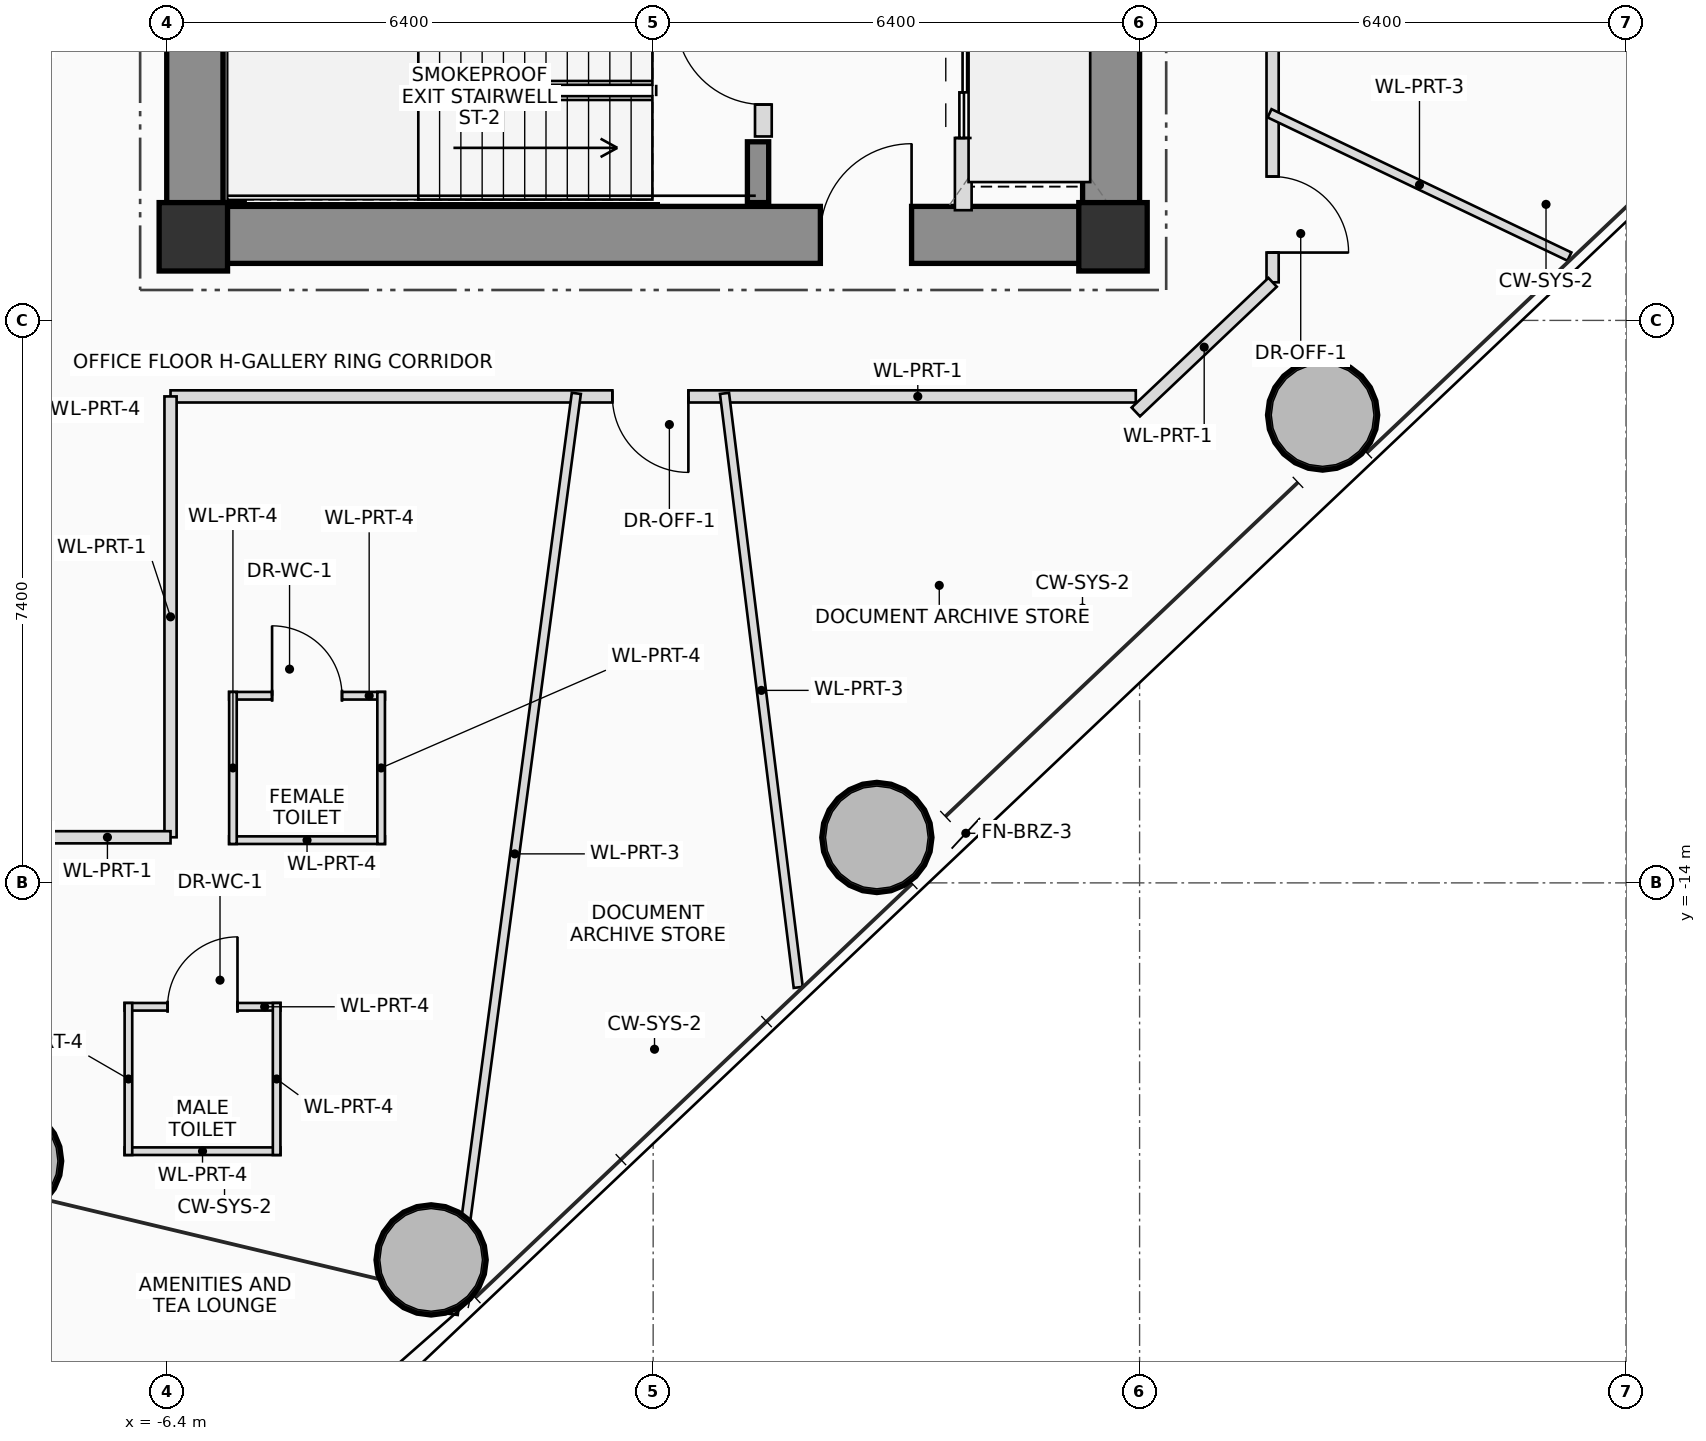
"""IFC4 building model, lengths in metres.
Left out: names, types, materials, properties, quantities, classifications, styles, units other than length and angle.
Written with IfcOpenShell. Run it as: python <this file> out.ifc"""

import sys

from ifc_helpers import new_model, si_unit, direction, frame, frame_2d, origin, origin_2d, place, context, subcontext, project, spatial, rectangle, hollow_circle, extrude, source, transform, mapped, element, fill, save


model = new_model("IFC4")
c1 = context("Model", 3, precision=1e-05, world=origin(), true_north=direction((0.0, 1.0)))
c2 = subcontext(c1, "Body", "Model", "MODEL_VIEW")
j1 = project(units=[si_unit("LENGTHUNIT", "METRE"), si_unit("PLANEANGLEUNIT", "RADIAN")], contexts=[c1])
p1 = place(None, origin())
s1 = spatial("IfcSite", under=j1, at=p1, CompositionType="ELEMENT")
p2 = place(p1, origin())
s2 = spatial("IfcBuilding", under=s1, at=p2, CompositionType="ELEMENT")
p3 = place(p2, frame((0.0, 0.0, 116.15)))
s3 = spatial("IfcBuildingStorey", under=s2, at=p3, CompositionType="ELEMENT", Elevation=116.15)
m1 = source(origin(), c2, "Body", "SweptSolid", [
    extrude(rectangle(XDim=0.9, YDim=0.9, at=origin_2d()), origin(), (0.0, 0.0, 1.0), 3.75),
])
for number, where, z_axis, x_axis in (
    (1, (-6.05, -5.5, 0.0), (0.0, 0.0, 1.0), (1.0, 0.0, 0.0)),
    (2, (6.05, -5.5, 0.0), (0.0, 0.0, 1.0), (1.0, 0.0, 0.0)),
):
    element("IfcColumn", number, at=place(p3, frame(where, z_axis=z_axis, x_axis=x_axis)), inside=s3, PredefinedType="COLUMN", context=c2, shape_type="MappedRepresentation", body=[
        mapped(m1, transform((0.0, 0.0, 0.0), scale=1.0)),
    ])
p4 = place(p3, frame((-6.4, -5.475, 0.0), z_axis=(0.0, 0.0, 1.0), x_axis=(1.0, 0.0, 0.0)))
e3 = element("IfcWall", 3, at=p4, inside=s3, PredefinedType="SHEAR", context=c2, shape_type="SweptSolid", body=[
    extrude(rectangle(XDim=12.8, YDim=0.75, at=frame_2d((6.4, 0.0))), origin(), (0.0, 0.0, 1.0), 3.75),
])
p5 = place(p4, frame((8.6, 0.0, 0.0)))
e4 = element("IfcOpeningElement", 4, at=p5, cuts=e3, PredefinedType="OPENING", context=c2, shape_type="SweptSolid", body=[
    extrude(rectangle(XDim=1.2, YDim=2.2, at=frame_2d((0.6, 1.1))), frame((0.0, 0.385, 0.0), z_axis=(0.0, -1.0, 0.0), x_axis=(1.0, 0.0, 0.0)), (0.0, 0.0, 1.0), 0.77),
])
p6 = place(p3, frame((6.025, -5.1, 0.0), z_axis=(0.0, 0.0, 1.0), x_axis=(0.0, 1.0, 0.0)))
e5 = element("IfcWall", 5, at=p6, inside=s3, PredefinedType="SHEAR", context=c2, shape_type="SweptSolid", body=[
    extrude(rectangle(XDim=10.2, YDim=0.75, at=frame_2d((5.1, 0.0))), origin(), (0.0, 0.0, 1.0), 3.75),
])
p7 = place(p3, frame((-6.025, -5.1, 0.0), z_axis=(0.0, 0.0, 1.0), x_axis=(0.0, 1.0, 0.0)))
e6 = element("IfcWall", 6, at=p7, inside=s3, PredefinedType="SHEAR", context=c2, shape_type="SweptSolid", body=[
    extrude(rectangle(XDim=3.35, YDim=0.75, at=frame_2d((1.675, 0.0))), origin(), (0.0, 0.0, 1.0), 3.75),
])
p8 = place(p3, frame((-5.52, -5.05, 0.0), z_axis=(0.0, 0.0, 1.0), x_axis=(0.0, 1.0, 0.0)))
e7 = element("IfcWall", 7, at=p8, inside=s3, PredefinedType="SHEAR", context=c2, shape_type="SweptSolid", body=[
    extrude(rectangle(XDim=2.75, YDim=0.28, at=frame_2d((1.375, 0.0))), origin(), (0.0, 0.0, 1.0), 3.75),
])
p9 = place(p3, frame((1.38, -5.05, 0.0), z_axis=(0.0, 0.0, 1.0), x_axis=(0.0, 1.0, 0.0)))
e8 = element("IfcWall", 8, at=p9, inside=s3, PredefinedType="SHEAR", context=c2, shape_type="SweptSolid", body=[
    extrude(rectangle(XDim=0.8, YDim=0.28, at=frame_2d((0.4, 0.0))), origin(), (0.0, 0.0, 1.0), 3.75),
])
m2 = source(origin(), c2, "Body", "SweptSolid", [
    extrude(hollow_circle(Radius=0.725, WallThickness=0.05, at=origin_2d()), origin(), (0.0, 0.0, 1.0), 3.75),
])
for number, where, z_axis, x_axis in (
    (9, (-2.921, -18.96, 0.0), (0.0, 0.0, 1.0), (1.0, 0.0, 0.0)),
    (10, (2.943, -13.402, 0.0), (0.0, 0.0, 1.0), (1.0, 0.0, 0.0)),
    (11, (8.808, -7.845, 0.0), (0.0, 0.0, 1.0), (1.0, 0.0, 0.0)),
    (12, (-8.507, -17.659, 0.0), (0.0, 0.0, 1.0), (1.0, 0.0, 0.0)),
):
    element("IfcColumn", number, at=place(p3, frame(where, z_axis=z_axis, x_axis=x_axis)), inside=s3, PredefinedType="COLUMN", context=c2, shape_type="MappedRepresentation", body=[
        mapped(m2, transform((0.0, 0.0, 0.0), scale=1.0)),
    ])
p10 = place(p3, frame((1.45, -4.18, 0.0), z_axis=(0.0, 0.0, 1.0), x_axis=(0.0, 1.0, 0.0)))
e13 = element("IfcWall", 13, at=p10, inside=s3, PredefinedType="PLUMBINGWALL", context=c2, shape_type="SweptSolid", body=[
    extrude(rectangle(XDim=1.98, YDim=0.22, at=frame_2d((0.99, 0.0))), origin(), (0.0, 0.0, 1.0), 3.51),
])
p11 = place(p10, frame((0.42, 0.0, 0.0)))
e14 = element("IfcOpeningElement", 14, at=p11, cuts=e13, PredefinedType="OPENING", context=c2, shape_type="SweptSolid", body=[
    extrude(rectangle(XDim=1.15, YDim=2.15, at=frame_2d((0.575, 1.075))), frame((0.0, 0.12, 0.0), z_axis=(0.0, -1.0, 0.0), x_axis=(1.0, 0.0, 0.0)), (0.0, 0.0, 1.0), 0.24),
])
p12 = place(p3, frame((4.08, -5.15, 0.0), z_axis=(0.0, 0.0, 1.0), x_axis=(0.0, 1.0, 0.0)))
e15 = element("IfcWall", 15, at=p12, inside=s3, PredefinedType="PLUMBINGWALL", context=c2, shape_type="SweptSolid", body=[
    extrude(rectangle(XDim=2.95, YDim=0.22, at=frame_2d((1.475, 0.0))), origin(), (0.0, 0.0, 1.0), 3.51),
])
p13 = place(p12, frame((0.95, 0.0, 0.0)))
e16 = element("IfcOpeningElement", 16, at=p13, cuts=e15, PredefinedType="OPENING", context=c2, shape_type="SweptSolid", body=[
    extrude(rectangle(XDim=1.2, YDim=2.25, at=frame_2d((0.6, 1.125))), frame((0.0, 0.12, 0.0), z_axis=(0.0, -1.0, 0.0), x_axis=(1.0, 0.0, 0.0)), (0.0, 0.0, 1.0), 0.24),
])
p14 = place(p3, frame((-6.954, -15.63, 0.0), z_axis=(0.0, 0.0, 1.0), x_axis=(1.0, 0.0, 0.0)))
e17 = element("IfcWall", 17, at=p14, inside=s3, PredefinedType="PARTITIONING", context=c2, shape_type="SweptSolid", body=[
    extrude(rectangle(XDim=2.05, YDim=0.1, at=frame_2d((1.025, 0.0))), origin(), (0.0, 0.0, 1.0), 3.51),
])
p15 = place(p14, frame((0.565, 0.0, 0.0)))
e18 = element("IfcOpeningElement", 18, at=p15, cuts=e17, PredefinedType="OPENING", context=c2, shape_type="SweptSolid", body=[
    extrude(rectangle(XDim=0.92, YDim=2.1, at=frame_2d((0.46, 1.05))), frame((0.0, 0.06, 0.0), z_axis=(0.0, -1.0, 0.0), x_axis=(1.0, 0.0, 0.0)), (0.0, 0.0, 1.0), 0.12),
])
p16 = place(p3, frame((-4.904, -17.53, 0.0), z_axis=(0.0, 0.0, 1.0), x_axis=(-1.0, 0.0, 0.0)))
e19 = element("IfcWall", 19, at=p16, inside=s3, PredefinedType="PARTITIONING", context=c2, shape_type="SweptSolid", body=[
    extrude(rectangle(XDim=2.05, YDim=0.1, at=frame_2d((1.025, 0.0))), origin(), (0.0, 0.0, 1.0), 3.51),
])
for number, where, z_axis, x_axis in (
    (20, (-4.954, -15.58, 0.0), (0.0, 0.0, 1.0), (0.0, -1.0, 0.0)),
    (21, (-6.904, -17.58, 0.0), (0.0, 0.0, 1.0), (0.0, 1.0, 0.0)),
):
    element("IfcWall", number, at=place(p3, frame(where, z_axis=z_axis, x_axis=x_axis)), inside=s3, PredefinedType="PARTITIONING", context=c2, shape_type="SweptSolid", body=[
        extrude(rectangle(XDim=2.0, YDim=0.1, at=frame_2d((1.0, 0.0))), origin(), (0.0, 0.0, 1.0), 3.51),
    ])
p17 = place(p3, frame((-5.579, -11.538, 0.0), z_axis=(0.0, 0.0, 1.0), x_axis=(1.0, 0.0, 0.0)))
e22 = element("IfcWall", 22, at=p17, inside=s3, PredefinedType="PARTITIONING", context=c2, shape_type="SweptSolid", body=[
    extrude(rectangle(XDim=2.05, YDim=0.1, at=frame_2d((1.025, 0.0))), origin(), (0.0, 0.0, 1.0), 2.815),
])
p18 = place(p17, frame((0.565, 0.0, 0.0)))
e23 = element("IfcOpeningElement", 23, at=p18, cuts=e22, PredefinedType="OPENING", context=c2, shape_type="SweptSolid", body=[
    extrude(rectangle(XDim=0.92, YDim=2.1, at=frame_2d((0.46, 1.05))), frame((0.0, 0.06, 0.0), z_axis=(0.0, -1.0, 0.0), x_axis=(1.0, 0.0, 0.0)), (0.0, 0.0, 1.0), 0.12),
])
p19 = place(p3, frame((-3.529, -13.438, 0.0), z_axis=(0.0, 0.0, 1.0), x_axis=(-1.0, 0.0, 0.0)))
e24 = element("IfcWall", 24, at=p19, inside=s3, PredefinedType="PARTITIONING", context=c2, shape_type="SweptSolid", body=[
    extrude(rectangle(XDim=2.05, YDim=0.1, at=frame_2d((1.025, 0.0))), origin(), (0.0, 0.0, 1.0), 2.815),
])
for number, where, z_axis, x_axis in (
    (25, (-3.579, -11.488, 0.0), (0.0, 0.0, 1.0), (0.0, -1.0, 0.0)),
    (26, (-5.529, -13.488, 0.0), (0.0, 0.0, 1.0), (0.0, 1.0, 0.0)),
):
    element("IfcWall", number, at=place(p3, frame(where, z_axis=z_axis, x_axis=x_axis)), inside=s3, PredefinedType="PARTITIONING", context=c2, shape_type="SweptSolid", body=[
        extrude(rectangle(XDim=2.0, YDim=0.1, at=frame_2d((1.0, 0.0))), origin(), (0.0, 0.0, 1.0), 3.015),
    ])
p20 = place(p3, frame((8.15, -0.02, 0.0), z_axis=(0.0, 0.0, 1.0), x_axis=(0.0, -1.0, 0.0)))
e27 = element("IfcWall", 27, at=p20, inside=s3, PredefinedType="PARTITIONING", context=c2, shape_type="SweptSolid", body=[
    extrude(rectangle(XDim=6.079, YDim=0.16, at=frame_2d((3.04, 0.0))), origin(), (0.0, 0.0, 1.0), 2.815),
])
p21 = place(p20, frame((4.688, 0.0, 0.0)))
e28 = element("IfcOpeningElement", 28, at=p21, cuts=e27, PredefinedType="OPENING", context=c2, shape_type="SweptSolid", body=[
    extrude(rectangle(XDim=1.0, YDim=2.25, at=frame_2d((0.5, 1.125))), frame((0.0, 0.09, 0.0), z_axis=(0.0, -1.0, 0.0), x_axis=(1.0, 0.0, 0.0)), (0.0, 0.0, 1.0), 0.18),
])
p22 = place(p3, frame((8.15, -6.099, 0.0), z_axis=(0.0, 0.0, 1.0), x_axis=(-0.725854359245, -0.687848420196, 0.0)))
e29 = element("IfcWall", 29, at=p22, inside=s3, PredefinedType="PARTITIONING", context=c2, shape_type="SweptSolid", body=[
    extrude(rectangle(XDim=2.479, YDim=0.16, at=frame_2d((1.24, 0.0))), origin(), (0.0, 0.0, 1.0), 2.815),
])
p23 = place(p3, frame((6.35, -7.6, 0.0), z_axis=(0.0, 0.0, 1.0), x_axis=(-1.0, 0.0, 0.0)))
e30 = element("IfcWall", 30, at=p23, inside=s3, PredefinedType="PARTITIONING", context=c2, shape_type="SweptSolid", body=[
    extrude(rectangle(XDim=12.7, YDim=0.16, at=frame_2d((6.35, 0.0))), origin(), (0.0, 0.0, 1.0), 2.815),
])
p24 = place(p23, frame((5.887, 0.0, 0.0)))
e31 = element("IfcOpeningElement", 31, at=p24, cuts=e30, PredefinedType="OPENING", context=c2, shape_type="SweptSolid", body=[
    extrude(rectangle(XDim=1.0, YDim=2.25, at=frame_2d((0.5, 1.125))), frame((0.0, 0.09, 0.0), z_axis=(0.0, -1.0, 0.0), x_axis=(1.0, 0.0, 0.0)), (0.0, 0.0, 1.0), 0.18),
])
p25 = place(p3, frame((-6.35, -7.6, 0.0), z_axis=(0.0, 0.0, 1.0), x_axis=(0.0, -1.0, 0.0)))
e32 = element("IfcWall", 32, at=p25, inside=s3, PredefinedType="PARTITIONING", context=c2, shape_type="SweptSolid", body=[
    extrude(rectangle(XDim=5.8, YDim=0.16, at=frame_2d((2.9, 0.0))), origin(), (0.0, 0.0, 1.0), 2.815),
])
p26 = place(p3, frame((-6.35, -13.4, 0.0), z_axis=(0.0, 0.0, 1.0), x_axis=(-1.0, 0.0, 0.0)))
e33 = element("IfcWall", 33, at=p26, inside=s3, PredefinedType="PARTITIONING", context=c2, shape_type="SweptSolid", body=[
    extrude(rectangle(XDim=1.66, YDim=0.16, at=frame_2d((0.83, 0.0))), origin(), (0.0, 0.0, 1.0), 2.815),
])
p27 = place(p3, frame((-1.011, -7.56, 0.0), z_axis=(0.0, 0.0, 1.0), x_axis=(-0.132529998166, -0.991178994726, 0.0)))
e34 = element("IfcWall", 34, at=p27, inside=s3, PredefinedType="PARTITIONING", context=c2, shape_type="SweptSolid", body=[
    extrude(rectangle(XDim=12.225, YDim=0.12, at=frame_2d((6.112, 0.0))), origin(), (0.0, 0.0, 1.0), 2.975),
])
p28 = place(p3, frame((0.939, -7.56, 0.0), z_axis=(0.0, 0.0, 1.0), x_axis=(0.12317613507, -0.992384824425, 0.0)))
e35 = element("IfcWall", 35, at=p28, inside=s3, PredefinedType="PARTITIONING", context=c2, shape_type="SweptSolid", body=[
    extrude(rectangle(XDim=7.875, YDim=0.12, at=frame_2d((3.938, 0.0))), origin(), (0.0, 0.0, 1.0), 2.975),
])
p29 = place(p3, frame((8.11, -3.875, 0.0), z_axis=(0.0, 0.0, 1.0), x_axis=(0.902280645173, -0.431149205433, 0.0)))
e36 = element("IfcWall", 36, at=p29, inside=s3, PredefinedType="PARTITIONING", context=c2, shape_type="SweptSolid", body=[
    extrude(rectangle(XDim=4.372, YDim=0.12, at=frame_2d((2.186, 0.0))), origin(), (0.0, 0.0, 1.0), 2.815),
])
p30 = place(p5, origin())
e37 = element("IfcDoor", 37, at=p30, inside=s3, OperationType="SINGLE_SWING_RIGHT", PredefinedType="DOOR", context=c2, shape_type="SweptSolid", body=[
    extrude(rectangle(XDim=1.2, YDim=2.2, at=frame_2d((0.6, 1.1))), frame((0.0, 0.025, 0.0), z_axis=(0.0, -1.0, 0.0), x_axis=(1.0, 0.0, 0.0)), (0.0, 0.0, 1.0), 0.05),
])
fill(e4, e37)
p31 = place(p11, origin())
e38 = element("IfcDoor", 38, at=p31, inside=s3, OperationType="SINGLE_SWING_RIGHT", PredefinedType="DOOR", context=c2, shape_type="SweptSolid", body=[
    extrude(rectangle(XDim=1.15, YDim=2.15, at=frame_2d((0.575, 1.075))), frame((0.0, 0.025, 0.0), z_axis=(0.0, -1.0, 0.0), x_axis=(1.0, 0.0, 0.0)), (0.0, 0.0, 1.0), 0.05),
])
fill(e14, e38)
p32 = place(p13, origin())
e39 = element("IfcDoor", 39, at=p32, inside=s3, OperationType="DOUBLE_DOOR_SLIDING", PredefinedType="DOOR", context=c2, shape_type="SweptSolid", body=[
    extrude(rectangle(XDim=1.2, YDim=2.25, at=frame_2d((0.6, 1.125))), frame((0.0, 0.025, 0.0), z_axis=(0.0, -1.0, 0.0), x_axis=(1.0, 0.0, 0.0)), (0.0, 0.0, 1.0), 0.05),
])
fill(e16, e39)
p33 = place(p15, origin())
e40 = element("IfcDoor", 40, at=p33, inside=s3, OperationType="SINGLE_SWING_RIGHT", PredefinedType="DOOR", context=c2, shape_type="SweptSolid", body=[
    extrude(rectangle(XDim=0.92, YDim=2.1, at=frame_2d((0.46, 1.05))), frame((0.0, 0.025, 0.0), z_axis=(0.0, -1.0, 0.0), x_axis=(1.0, 0.0, 0.0)), (0.0, 0.0, 1.0), 0.05),
])
fill(e18, e40)
p34 = place(p18, origin())
e41 = element("IfcDoor", 41, at=p34, inside=s3, OperationType="SINGLE_SWING_LEFT", PredefinedType="DOOR", context=c2, shape_type="SweptSolid", body=[
    extrude(rectangle(XDim=0.92, YDim=2.1, at=frame_2d((0.46, 1.05))), frame((0.0, 0.025, 0.0), z_axis=(0.0, -1.0, 0.0), x_axis=(1.0, 0.0, 0.0)), (0.0, 0.0, 1.0), 0.05),
])
fill(e23, e41)
p35 = place(p21, origin())
e42 = element("IfcDoor", 42, at=p35, inside=s3, OperationType="SINGLE_SWING_RIGHT", PredefinedType="DOOR", context=c2, shape_type="SweptSolid", body=[
    extrude(rectangle(XDim=1.0, YDim=2.25, at=frame_2d((0.5, 1.125))), frame((0.0, 0.025, 0.0), z_axis=(0.0, -1.0, 0.0), x_axis=(1.0, 0.0, 0.0)), (0.0, 0.0, 1.0), 0.05),
])
fill(e28, e42)
p36 = place(p24, origin())
e43 = element("IfcDoor", 43, at=p36, inside=s3, OperationType="SINGLE_SWING_LEFT", PredefinedType="DOOR", context=c2, shape_type="SweptSolid", body=[
    extrude(rectangle(XDim=1.0, YDim=2.25, at=frame_2d((0.5, 1.125))), frame((0.0, 0.025, 0.0), z_axis=(0.0, -1.0, 0.0), x_axis=(1.0, 0.0, 0.0)), (0.0, 0.0, 1.0), 0.05),
])
fill(e31, e43)
save(model, sys.argv[1])
